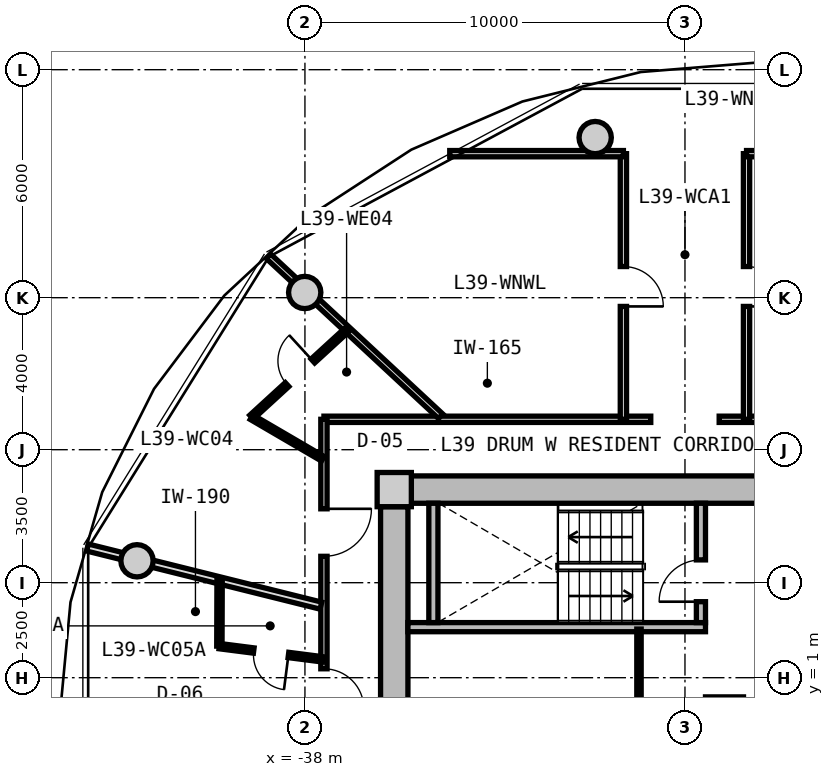
"""IFC4 building model, lengths in metres.
Left out: names, types, materials, properties, quantities, classifications, styles, units other than length and angle.
Written with IfcOpenShell. Run it as: python <this file> out.ifc"""

import sys

from ifc_helpers import new_model, si_unit, direction, frame, frame_2d, origin, origin_2d, place, context, subcontext, project, spatial, rectangle, circle, extrude, source, transform, mapped, element, fill, save


model = new_model("IFC4")
c1 = context("Model", 3, precision=1e-05, world=origin(), true_north=direction((0.0, 1.0)))
c2 = subcontext(c1, "Body", "Model", "MODEL_VIEW")
j1 = project(units=[si_unit("LENGTHUNIT", "METRE"), si_unit("PLANEANGLEUNIT", "RADIAN")], contexts=[c1])
p1 = place(None, origin())
s1 = spatial("IfcSite", under=j1, at=p1, CompositionType="ELEMENT")
p2 = place(p1, origin())
s2 = spatial("IfcBuilding", under=s1, at=p2, CompositionType="ELEMENT")
p3 = place(p2, frame((0.0, 0.0, 126.75)))
s3 = spatial("IfcBuildingStorey", under=s2, at=p3, CompositionType="ELEMENT", Elevation=126.75)
m1 = source(origin(), c2, "Body", "SweptSolid", [
    extrude(rectangle(XDim=0.9, YDim=0.9, at=origin_2d()), origin(), (0.0, 0.0, 1.0), 3.05),
])
p4 = place(p3, frame((-35.65, 5.95, 0.0), z_axis=(0.0, 0.0, 1.0), x_axis=(1.0, 0.0, 0.0)))
e1 = element("IfcColumn", 1, at=p4, inside=s3, PredefinedType="COLUMN", context=c2, shape_type="MappedRepresentation", body=[
    mapped(m1, transform((0.0, 0.0, 0.0), x_axis=(1.0, 0.0, 0.0), y_axis=(0.0, 1.0, 0.0), z_axis=(0.0, 0.0, 1.0), scale=1.0)),
])
m2 = source(origin(), c2, "Body", "SweptSolid", [
    extrude(rectangle(XDim=14.4, YDim=0.72, at=frame_2d((7.2, 0.0))), origin(), (0.0, 0.0, 1.0), 2.73),
])
p5 = place(p3, frame((-35.2, 5.95, 0.0), z_axis=(0.0, 0.0, 1.0), x_axis=(1.0, 0.0, 0.0)))
e2 = element("IfcWall", 2, at=p5, inside=s3, PredefinedType="SHEAR", context=c2, shape_type="MappedRepresentation", body=[
    mapped(m2, transform((0.0, 0.0, 0.0), x_axis=(1.0, 0.0, 0.0), y_axis=(0.0, 1.0, 0.0), z_axis=(0.0, 0.0, 1.0), scale=1.0)),
])
m3 = source(origin(), c2, "Body", "SweptSolid", [
    extrude(rectangle(XDim=11.0, YDim=0.72, at=frame_2d((5.5, 0.0))), origin(), (0.0, 0.0, 1.0), 2.73),
])
p6 = place(p3, frame((-35.65, -5.5, 0.0), z_axis=(0.0, 0.0, 1.0), x_axis=(0.0, 1.0, 0.0)))
e3 = element("IfcWall", 3, at=p6, inside=s3, PredefinedType="SHEAR", context=c2, shape_type="MappedRepresentation", body=[
    mapped(m3, transform((0.0, 0.0, 0.0), x_axis=(1.0, 0.0, 0.0), y_axis=(0.0, 1.0, 0.0), z_axis=(0.0, 0.0, 1.0), scale=1.0)),
])
p7 = place(p6, frame((3.8, 0.0, 0.0)))
e4 = element("IfcOpeningElement", 4, at=p7, cuts=e3, PredefinedType="OPENING", context=c2, shape_type="SweptSolid", body=[
    extrude(rectangle(XDim=1.2, YDim=2.15, at=frame_2d((0.6, 1.075))), frame((0.0, 0.37, 0.0), z_axis=(0.0, -1.0, 0.0), x_axis=(1.0, 0.0, 0.0)), (0.0, 0.0, 1.0), 0.74),
])
m4 = source(origin(), c2, "Body", "SweptSolid", [
    extrude(circle(Radius=0.425, at=origin_2d()), origin(), (0.0, 0.0, 1.0), 3.05),
])
for number, where, z_axis, x_axis in (
    (5, (-30.363, 15.213, 0.0), (0.0, 0.0, 1.0), (1.0, 0.0, 0.0)),
    (6, (-38.006, 11.137, 0.0), (0.0, 0.0, 1.0), (1.0, 0.0, 0.0)),
    (7, (-42.419, 4.076, 0.0), (0.0, 0.0, 1.0), (1.0, 0.0, 0.0)),
):
    element("IfcColumn", number, at=place(p3, frame(where, z_axis=z_axis, x_axis=x_axis)), inside=s3, PredefinedType="COLUMN", context=c2, shape_type="MappedRepresentation", body=[
        mapped(m4, transform((0.0, 0.0, 0.0), x_axis=(1.0, 0.0, 0.0), y_axis=(0.0, 1.0, 0.0), z_axis=(0.0, 0.0, 1.0), scale=1.0)),
    ])
m5 = source(origin(), c2, "Body", "SweptSolid", [
    extrude(rectangle(XDim=7.83, YDim=0.24, at=frame_2d((3.915, 0.0))), origin(), (0.0, 0.0, 1.0), 2.73),
])
p8 = place(p3, frame((-35.29, 2.33, 0.0), z_axis=(0.0, 0.0, 1.0), x_axis=(1.0, 0.0, 0.0)))
e8 = element("IfcWall", 8, at=p8, inside=s3, PredefinedType="PARTITIONING", context=c2, shape_type="MappedRepresentation", body=[
    mapped(m5, transform((0.0, 0.0, 0.0), x_axis=(1.0, 0.0, 0.0), y_axis=(0.0, 1.0, 0.0), z_axis=(0.0, 0.0, 1.0), scale=1.0)),
])
m6 = source(origin(), c2, "Body", "SweptSolid", [
    extrude(rectangle(XDim=3.14, YDim=0.24, at=frame_2d((1.57, 0.0))), origin(), (0.0, 0.0, 1.0), 2.73),
])
p9 = place(p3, frame((-34.62, 2.45, 0.0), z_axis=(0.0, 0.0, 1.0), x_axis=(0.0, 1.0, 0.0)))
e9 = element("IfcWall", 9, at=p9, inside=s3, PredefinedType="PARTITIONING", context=c2, shape_type="MappedRepresentation", body=[
    mapped(m6, transform((0.0, 0.0, 0.0), x_axis=(1.0, 0.0, 0.0), y_axis=(0.0, 1.0, 0.0), z_axis=(0.0, 0.0, 1.0), scale=1.0)),
])
p10 = place(p3, frame((-27.58, 2.45, 0.0), z_axis=(0.0, 0.0, 1.0), x_axis=(0.0, 1.0, 0.0)))
e10 = element("IfcWall", 10, at=p10, inside=s3, PredefinedType="PARTITIONING", context=c2, shape_type="MappedRepresentation", body=[
    mapped(m6, transform((0.0, 0.0, 0.0), x_axis=(1.0, 0.0, 0.0), y_axis=(0.0, 1.0, 0.0), z_axis=(0.0, 0.0, 1.0), scale=1.0)),
])
p11 = place(p10, frame((0.55, 0.0, 0.0)))
e11 = element("IfcOpeningElement", 11, at=p11, cuts=e10, PredefinedType="OPENING", context=c2, shape_type="SweptSolid", body=[
    extrude(rectangle(XDim=1.1, YDim=2.15, at=frame_2d((0.55, 1.075))), frame((0.0, 0.13, 0.0), z_axis=(0.0, -1.0, 0.0), x_axis=(1.0, 0.0, 0.0)), (0.0, 0.0, 1.0), 0.26),
])
m7 = source(origin(), c2, "Body", "SweptSolid", [
    extrude(rectangle(XDim=6.66, YDim=0.21, at=frame_2d((3.33, 0.0))), origin(), (0.0, 0.0, 1.0), 2.715),
])
p12 = place(p3, frame((-27.46, 0.39, 0.0), z_axis=(0.0, 0.0, 1.0), x_axis=(1.0, 0.0, 0.0)))
e12 = element("IfcWall", 12, at=p12, inside=s3, PredefinedType="PARTITIONING", context=c2, shape_type="MappedRepresentation", body=[
    mapped(m7, transform((0.0, 0.0, 0.0), x_axis=(1.0, 0.0, 0.0), y_axis=(0.0, 1.0, 0.0), z_axis=(0.0, 0.0, 1.0), scale=1.0)),
])
p13 = place(p12, frame((1.0, 0.0, 0.0)))
e13 = element("IfcOpeningElement", 13, at=p13, cuts=e12, PredefinedType="OPENING", context=c2, shape_type="SweptSolid", body=[
    extrude(rectangle(XDim=1.2, YDim=2.15, at=frame_2d((0.6, 1.075))), frame((0.0, 0.115, 0.0), z_axis=(0.0, -1.0, 0.0), x_axis=(1.0, 0.0, 0.0)), (0.0, 0.0, 1.0), 0.23),
])
m8 = source(origin(), c2, "Body", "SweptSolid", [
    extrude(rectangle(XDim=2.33, YDim=0.115, at=frame_2d((1.165, 0.0))), origin(), (0.0, 0.0, 1.0), 2.715),
])
p14 = place(p3, frame((-29.21, -0.05, 0.0), z_axis=(0.0, 0.0, 1.0), x_axis=(0.0, 1.0, 0.0)))
e14 = element("IfcWall", 14, at=p14, inside=s3, PredefinedType="PARTITIONING", context=c2, shape_type="MappedRepresentation", body=[
    mapped(m8, transform((0.0, 0.0, 0.0), x_axis=(1.0, 0.0, 0.0), y_axis=(0.0, 1.0, 0.0), z_axis=(0.0, 0.0, 1.0), scale=1.0)),
])
m9 = source(origin(), c2, "Body", "SweptSolid", [
    extrude(rectangle(XDim=8.6, YDim=0.165, at=frame_2d((4.3, 0.0))), origin(), (0.0, 0.0, 1.0), 2.715),
])
p15 = place(p3, frame((-37.5, 7.8, 0.0), z_axis=(0.0, 0.0, 1.0), x_axis=(1.0, 0.0, 0.0)))
e15 = element("IfcWall", 15, at=p15, inside=s3, PredefinedType="PARTITIONING", context=c2, shape_type="MappedRepresentation", body=[
    mapped(m9, transform((0.0, 0.0, 0.0), x_axis=(1.0, 0.0, 0.0), y_axis=(0.0, 1.0, 0.0), z_axis=(0.0, 0.0, 1.0), scale=1.0)),
])
p16 = place(p3, frame((-27.1, 7.8, 0.0), z_axis=(0.0, 0.0, 1.0), x_axis=(1.0, 0.0, 0.0)))
e16 = element("IfcWall", 16, at=p16, inside=s3, PredefinedType="PARTITIONING", context=c2, shape_type="MappedRepresentation", body=[
    mapped(m9, transform((0.0, 0.0, 0.0), x_axis=(1.0, 0.0, 0.0), y_axis=(0.0, 1.0, 0.0), z_axis=(0.0, 0.0, 1.0), scale=1.0)),
])
p17 = place(p16, frame((5.275, 0.0, 0.0)))
e17 = element("IfcOpeningElement", 17, at=p17, cuts=e16, PredefinedType="OPENING", context=c2, shape_type="SweptSolid", body=[
    extrude(rectangle(XDim=1.25, YDim=2.2, at=frame_2d((0.625, 1.1))), frame((0.0, 0.093, 0.0), z_axis=(0.0, -1.0, 0.0), x_axis=(1.0, 0.0, 0.0)), (0.0, 0.0, 1.0), 0.185),
])
m10 = source(origin(), c2, "Body", "SweptSolid", [
    extrude(rectangle(XDim=15.6, YDim=0.165, at=frame_2d((7.8, 0.0))), origin(), (0.0, 0.0, 1.0), 2.715),
])
p18 = place(p3, frame((-37.5, -7.8, 0.0), z_axis=(0.0, 0.0, 1.0), x_axis=(0.0, 1.0, 0.0)))
e18 = element("IfcWall", 18, at=p18, inside=s3, PredefinedType="PARTITIONING", context=c2, shape_type="MappedRepresentation", body=[
    mapped(m10, transform((0.0, 0.0, 0.0), x_axis=(1.0, 0.0, 0.0), y_axis=(0.0, 1.0, 0.0), z_axis=(0.0, 0.0, 1.0), scale=1.0)),
])
p19 = place(p18, frame((11.994, 0.0, 0.0)))
e19 = element("IfcOpeningElement", 19, at=p19, cuts=e18, PredefinedType="OPENING", context=c2, shape_type="SweptSolid", body=[
    extrude(rectangle(XDim=1.25, YDim=2.2, at=frame_2d((0.625, 1.1))), frame((0.0, 0.093, 0.0), z_axis=(0.0, -1.0, 0.0), x_axis=(1.0, 0.0, 0.0)), (0.0, 0.0, 1.0), 0.185),
])
p20 = place(p18, frame((7.984, 0.0, 0.0)))
e20 = element("IfcOpeningElement", 20, at=p20, cuts=e18, PredefinedType="OPENING", context=c2, shape_type="SweptSolid", body=[
    extrude(rectangle(XDim=1.05, YDim=2.15, at=frame_2d((0.525, 1.075))), frame((0.0, 0.093, 0.0), z_axis=(0.0, -1.0, 0.0), x_axis=(1.0, 0.0, 0.0)), (0.0, 0.0, 1.0), 0.185),
])
p21 = place(p18, frame((5.777, 0.0, 0.0)))
e21 = element("IfcOpeningElement", 21, at=p21, cuts=e18, PredefinedType="OPENING", context=c2, shape_type="SweptSolid", body=[
    extrude(rectangle(XDim=1.05, YDim=2.15, at=frame_2d((0.525, 1.075))), frame((0.0, 0.093, 0.0), z_axis=(0.0, -1.0, 0.0), x_axis=(1.0, 0.0, 0.0)), (0.0, 0.0, 1.0), 0.185),
])
p22 = place(p18, frame((2.676, 0.0, 0.0)))
e22 = element("IfcOpeningElement", 22, at=p22, cuts=e18, PredefinedType="OPENING", context=c2, shape_type="SweptSolid", body=[
    extrude(rectangle(XDim=1.05, YDim=2.15, at=frame_2d((0.525, 1.075))), frame((0.0, 0.093, 0.0), z_axis=(0.0, -1.0, 0.0), x_axis=(1.0, 0.0, 0.0)), (0.0, 0.0, 1.0), 0.185),
])
m11 = source(origin(), c2, "Body", "SweptSolid", [
    extrude(rectangle(XDim=6.187, YDim=0.165, at=frame_2d((3.093, 0.0))), origin(), (0.0, 0.0, 1.0), 2.215),
])
p23 = place(p3, frame((-34.429, 7.88, 0.0), z_axis=(0.0, 0.0, 1.0), x_axis=(-0.732501077882, 0.680765870841, 0.0)))
e23 = element("IfcWall", 23, at=p23, inside=s3, PredefinedType="PARTITIONING", context=c2, shape_type="MappedRepresentation", body=[
    mapped(m11, transform((0.0, 0.0, 0.0), x_axis=(1.0, 0.0, 0.0), y_axis=(0.0, 1.0, 0.0), z_axis=(0.0, 0.0, 1.0), scale=1.0)),
])
m12 = source(origin(), c2, "Body", "SweptSolid", [
    extrude(rectangle(XDim=6.99, YDim=0.165, at=frame_2d((3.495, 0.0))), origin(), (0.0, 0.0, 1.0), 2.215),
])
p24 = place(p3, frame((-29.62, 7.8, 0.0), z_axis=(0.0, 0.0, 1.0), x_axis=(0.0, 1.0, 0.0)))
e24 = element("IfcWall", 24, at=p24, inside=s3, PredefinedType="PARTITIONING", context=c2, shape_type="MappedRepresentation", body=[
    mapped(m12, transform((0.0, 0.0, 0.0), x_axis=(1.0, 0.0, 0.0), y_axis=(0.0, 1.0, 0.0), z_axis=(0.0, 0.0, 1.0), scale=1.0)),
])
p25 = place(p24, frame((2.97, 0.0, 0.0)))
e25 = element("IfcOpeningElement", 25, at=p25, cuts=e24, PredefinedType="OPENING", context=c2, shape_type="SweptSolid", body=[
    extrude(rectangle(XDim=1.05, YDim=2.15, at=frame_2d((0.525, 1.075))), frame((0.0, 0.093, 0.0), z_axis=(0.0, -1.0, 0.0), x_axis=(1.0, 0.0, 0.0)), (0.0, 0.0, 1.0), 0.185),
])
m13 = source(origin(), c2, "Body", "SweptSolid", [
    extrude(rectangle(XDim=4.569, YDim=0.165, at=frame_2d((2.285, 0.0))), origin(), (0.0, 0.0, 1.0), 2.715),
])
p26 = place(p3, frame((-34.189, 14.79, 0.0), z_axis=(0.0, 0.0, 1.0), x_axis=(1.0, 0.0, 0.0)))
e26 = element("IfcWall", 26, at=p26, inside=s3, PredefinedType="PARTITIONING", context=c2, shape_type="MappedRepresentation", body=[
    mapped(m13, transform((0.0, 0.0, 0.0), x_axis=(1.0, 0.0, 0.0), y_axis=(0.0, 1.0, 0.0), z_axis=(0.0, 0.0, 1.0), scale=1.0)),
])
m14 = source(origin(), c2, "Body", "SweptSolid", [
    extrude(rectangle(XDim=6.99, YDim=0.165, at=frame_2d((3.495, 0.0))), origin(), (0.0, 0.0, 1.0), 2.715),
])
p27 = place(p3, frame((-26.38, 7.8, 0.0), z_axis=(0.0, 0.0, 1.0), x_axis=(0.0, 1.0, 0.0)))
e27 = element("IfcWall", 27, at=p27, inside=s3, PredefinedType="PARTITIONING", context=c2, shape_type="MappedRepresentation", body=[
    mapped(m14, transform((0.0, 0.0, 0.0), x_axis=(1.0, 0.0, 0.0), y_axis=(0.0, 1.0, 0.0), z_axis=(0.0, 0.0, 1.0), scale=1.0)),
])
p28 = place(p27, frame((2.97, 0.0, 0.0)))
e28 = element("IfcOpeningElement", 28, at=p28, cuts=e27, PredefinedType="OPENING", context=c2, shape_type="SweptSolid", body=[
    extrude(rectangle(XDim=1.05, YDim=2.15, at=frame_2d((0.525, 1.075))), frame((0.0, 0.093, 0.0), z_axis=(0.0, -1.0, 0.0), x_axis=(1.0, 0.0, 0.0)), (0.0, 0.0, 1.0), 0.185),
])
m15 = source(origin(), c2, "Body", "SweptSolid", [
    extrude(rectangle(XDim=4.851, YDim=0.165, at=frame_2d((2.425, 0.0))), origin(), (0.0, 0.0, 1.0), 2.715),
])
p29 = place(p3, frame((-26.38, 14.79, 0.0), z_axis=(0.0, 0.0, 1.0), x_axis=(1.0, 0.0, 0.0)))
e29 = element("IfcWall", 29, at=p29, inside=s3, PredefinedType="PARTITIONING", context=c2, shape_type="MappedRepresentation", body=[
    mapped(m15, transform((0.0, 0.0, 0.0), x_axis=(1.0, 0.0, 0.0), y_axis=(0.0, 1.0, 0.0), z_axis=(0.0, 0.0, 1.0), scale=1.0)),
])
m16 = source(origin(), c2, "Body", "SweptSolid", [
    extrude(rectangle(XDim=6.331, YDim=0.19, at=frame_2d((3.165, 0.0))), origin(), (0.0, 0.0, 1.0), 2.215),
])
p30 = place(p3, frame((-37.58, 2.896, 0.0), z_axis=(0.0, 0.0, 1.0), x_axis=(-0.97036440661, 0.241646267062, 0.0)))
e30 = element("IfcWall", 30, at=p30, inside=s3, PredefinedType="PARTITIONING", context=c2, shape_type="MappedRepresentation", body=[
    mapped(m16, transform((0.0, 0.0, 0.0), x_axis=(1.0, 0.0, 0.0), y_axis=(0.0, 1.0, 0.0), z_axis=(0.0, 0.0, 1.0), scale=1.0)),
])
m17 = source(origin(), c2, "Body", "SweptSolid", [
    extrude(rectangle(XDim=2.172, YDim=0.14, at=frame_2d((1.086, 0.0))), origin(), (0.0, 0.0, 1.0), 2.715),
])
p31 = place(p3, frame((-37.53, 6.762, 0.0), z_axis=(0.0, 0.0, 1.0), x_axis=(-0.863562702562, 0.504241468688, 0.0)))
e31 = element("IfcWall", 31, at=p31, inside=s3, PredefinedType="PARTITIONING", context=c2, shape_type="MappedRepresentation", body=[
    mapped(m17, transform((0.0, 0.0, 0.0), x_axis=(1.0, 0.0, 0.0), y_axis=(0.0, 1.0, 0.0), z_axis=(0.0, 0.0, 1.0), scale=1.0)),
])
m18 = source(origin(), c2, "Body", "SweptSolid", [
    extrude(rectangle(XDim=3.457, YDim=0.14, at=frame_2d((1.729, 0.0))), origin(), (0.0, 0.0, 1.0), 2.715),
])
p32 = place(p3, frame((-39.405, 7.857, 0.0), z_axis=(0.0, 0.0, 1.0), x_axis=(0.737567375492, 0.675273549467, 0.0)))
e32 = element("IfcWall", 32, at=p32, inside=s3, PredefinedType="PARTITIONING", context=c2, shape_type="MappedRepresentation", body=[
    mapped(m18, transform((0.0, 0.0, 0.0), x_axis=(1.0, 0.0, 0.0), y_axis=(0.0, 1.0, 0.0), z_axis=(0.0, 0.0, 1.0), scale=1.0)),
])
p33 = place(p32, frame((1.268, 0.0, 0.0)))
e33 = element("IfcOpeningElement", 33, at=p33, cuts=e32, PredefinedType="OPENING", context=c2, shape_type="SweptSolid", body=[
    extrude(rectangle(XDim=0.92, YDim=2.1, at=frame_2d((0.46, 1.05))), frame((0.0, 0.08, 0.0), z_axis=(0.0, -1.0, 0.0), x_axis=(1.0, 0.0, 0.0)), (0.0, 0.0, 1.0), 0.16),
])
m19 = source(origin(), c2, "Body", "SweptSolid", [
    extrude(rectangle(XDim=2.744, YDim=0.14, at=frame_2d((1.372, 0.0))), origin(), (0.0, 0.0, 1.0), 2.715),
])
p34 = place(p3, frame((-37.53, 1.482, 0.0), z_axis=(0.0, 0.0, 1.0), x_axis=(-0.991916450239, 0.126892693823, 0.0)))
e34 = element("IfcWall", 34, at=p34, inside=s3, PredefinedType="PARTITIONING", context=c2, shape_type="MappedRepresentation", body=[
    mapped(m19, transform((0.0, 0.0, 0.0), x_axis=(1.0, 0.0, 0.0), y_axis=(0.0, 1.0, 0.0), z_axis=(0.0, 0.0, 1.0), scale=1.0)),
])
p35 = place(p34, frame((0.912, 0.0, 0.0)))
e35 = element("IfcOpeningElement", 35, at=p35, cuts=e34, PredefinedType="OPENING", context=c2, shape_type="SweptSolid", body=[
    extrude(rectangle(XDim=0.92, YDim=2.1, at=frame_2d((0.46, 1.05))), frame((0.0, 0.08, 0.0), z_axis=(0.0, -1.0, 0.0), x_axis=(1.0, 0.0, 0.0)), (0.0, 0.0, 1.0), 0.16),
])
m20 = source(origin(), c2, "Body", "SweptSolid", [
    extrude(rectangle(XDim=1.749, YDim=0.14, at=frame_2d((0.875, 0.0))), origin(), (0.0, 0.0, 1.0), 2.715),
])
p36 = place(p3, frame((-40.251, 1.831, 0.0), z_axis=(0.0, 0.0, 1.0), x_axis=(0.003350064953, 0.999994388517, 0.0)))
e36 = element("IfcWall", 36, at=p36, inside=s3, PredefinedType="PARTITIONING", context=c2, shape_type="MappedRepresentation", body=[
    mapped(m20, transform((0.0, 0.0, 0.0), x_axis=(1.0, 0.0, 0.0), y_axis=(0.0, 1.0, 0.0), z_axis=(0.0, 0.0, 1.0), scale=1.0)),
])
m21 = source(origin(), c2, "Body", "SweptSolid", [
    extrude(rectangle(XDim=1.1, YDim=2.15, at=frame_2d((0.55, 1.075))), frame((0.0, 0.025, 0.0), z_axis=(0.0, -1.0, 0.0), x_axis=(1.0, 0.0, 0.0)), (0.0, 0.0, 1.0), 0.05),
])
p37 = place(p11, origin())
e37 = element("IfcDoor", 37, at=p37, inside=s3, OperationType="SINGLE_SWING_LEFT", PredefinedType="DOOR", context=c2, shape_type="MappedRepresentation", body=[
    mapped(m21, transform((0.0, 0.0, 0.0), x_axis=(1.0, 0.0, 0.0), y_axis=(0.0, 1.0, 0.0), z_axis=(0.0, 0.0, 1.0), scale=1.0)),
])
fill(e11, e37)
m22 = source(origin(), c2, "Body", "SweptSolid", [
    extrude(rectangle(XDim=1.05, YDim=2.15, at=frame_2d((0.525, 1.075))), frame((0.0, 0.025, 0.0), z_axis=(0.0, -1.0, 0.0), x_axis=(1.0, 0.0, 0.0)), (0.0, 0.0, 1.0), 0.05),
])
p38 = place(p25, frame((1.05, 0.0, 0.0), z_axis=(0.0, 0.0, 1.0), x_axis=(-1.0, 0.0, 0.0)))
e38 = element("IfcDoor", 38, at=p38, inside=s3, OperationType="SINGLE_SWING_RIGHT", PredefinedType="DOOR", context=c2, shape_type="MappedRepresentation", body=[
    mapped(m22, transform((0.0, 0.0, 0.0), x_axis=(1.0, 0.0, 0.0), y_axis=(0.0, 1.0, 0.0), z_axis=(0.0, 0.0, 1.0), scale=1.0)),
])
fill(e25, e38)
p39 = place(p28, frame((1.05, 0.0, 0.0), z_axis=(0.0, 0.0, 1.0), x_axis=(-1.0, 0.0, 0.0)))
e39 = element("IfcDoor", 39, at=p39, inside=s3, OperationType="SINGLE_SWING_RIGHT", PredefinedType="DOOR", context=c2, shape_type="MappedRepresentation", body=[
    mapped(m22, transform((0.0, 0.0, 0.0), x_axis=(1.0, 0.0, 0.0), y_axis=(0.0, 1.0, 0.0), z_axis=(0.0, 0.0, 1.0), scale=1.0)),
])
fill(e28, e39)
m23 = source(origin(), c2, "Body", "SweptSolid", [
    extrude(rectangle(XDim=1.25, YDim=2.2, at=frame_2d((0.625, 1.1))), frame((0.0, 0.025, 0.0), z_axis=(0.0, -1.0, 0.0), x_axis=(1.0, 0.0, 0.0)), (0.0, 0.0, 1.0), 0.05),
])
p40 = place(p19, frame((1.25, 0.0, 0.0), z_axis=(0.0, 0.0, 1.0), x_axis=(-1.0, 0.0, 0.0)))
e40 = element("IfcDoor", 40, at=p40, inside=s3, OperationType="SINGLE_SWING_LEFT", PredefinedType="DOOR", context=c2, shape_type="MappedRepresentation", body=[
    mapped(m23, transform((0.0, 0.0, 0.0), x_axis=(1.0, 0.0, 0.0), y_axis=(0.0, 1.0, 0.0), z_axis=(0.0, 0.0, 1.0), scale=1.0)),
])
fill(e19, e40)
m24 = source(origin(), c2, "Body", "SweptSolid", [
    extrude(rectangle(XDim=0.92, YDim=2.1, at=frame_2d((0.46, 1.05))), frame((0.0, 0.025, 0.0), z_axis=(0.0, -1.0, 0.0), x_axis=(1.0, 0.0, 0.0)), (0.0, 0.0, 1.0), 0.05),
])
p41 = place(p33, origin())
e41 = element("IfcDoor", 41, at=p41, inside=s3, OperationType="SINGLE_SWING_RIGHT", PredefinedType="DOOR", context=c2, shape_type="MappedRepresentation", body=[
    mapped(m24, transform((0.0, 0.0, 0.0), x_axis=(1.0, 0.0, 0.0), y_axis=(0.0, 1.0, 0.0), z_axis=(0.0, 0.0, 1.0), scale=1.0)),
])
fill(e33, e41)
p42 = place(p20, frame((1.05, 0.0, 0.0), z_axis=(0.0, 0.0, 1.0), x_axis=(-1.0, 0.0, 0.0)))
e42 = element("IfcDoor", 42, at=p42, inside=s3, OperationType="SINGLE_SWING_RIGHT", PredefinedType="DOOR", context=c2, shape_type="MappedRepresentation", body=[
    mapped(m22, transform((0.0, 0.0, 0.0), x_axis=(1.0, 0.0, 0.0), y_axis=(0.0, 1.0, 0.0), z_axis=(0.0, 0.0, 1.0), scale=1.0)),
])
fill(e20, e42)
p43 = place(p35, origin())
e43 = element("IfcDoor", 43, at=p43, inside=s3, OperationType="SINGLE_SWING_LEFT", PredefinedType="DOOR", context=c2, shape_type="MappedRepresentation", body=[
    mapped(m24, transform((0.0, 0.0, 0.0), x_axis=(1.0, 0.0, 0.0), y_axis=(0.0, 1.0, 0.0), z_axis=(0.0, 0.0, 1.0), scale=1.0)),
])
fill(e35, e43)
save(model, sys.argv[1])
